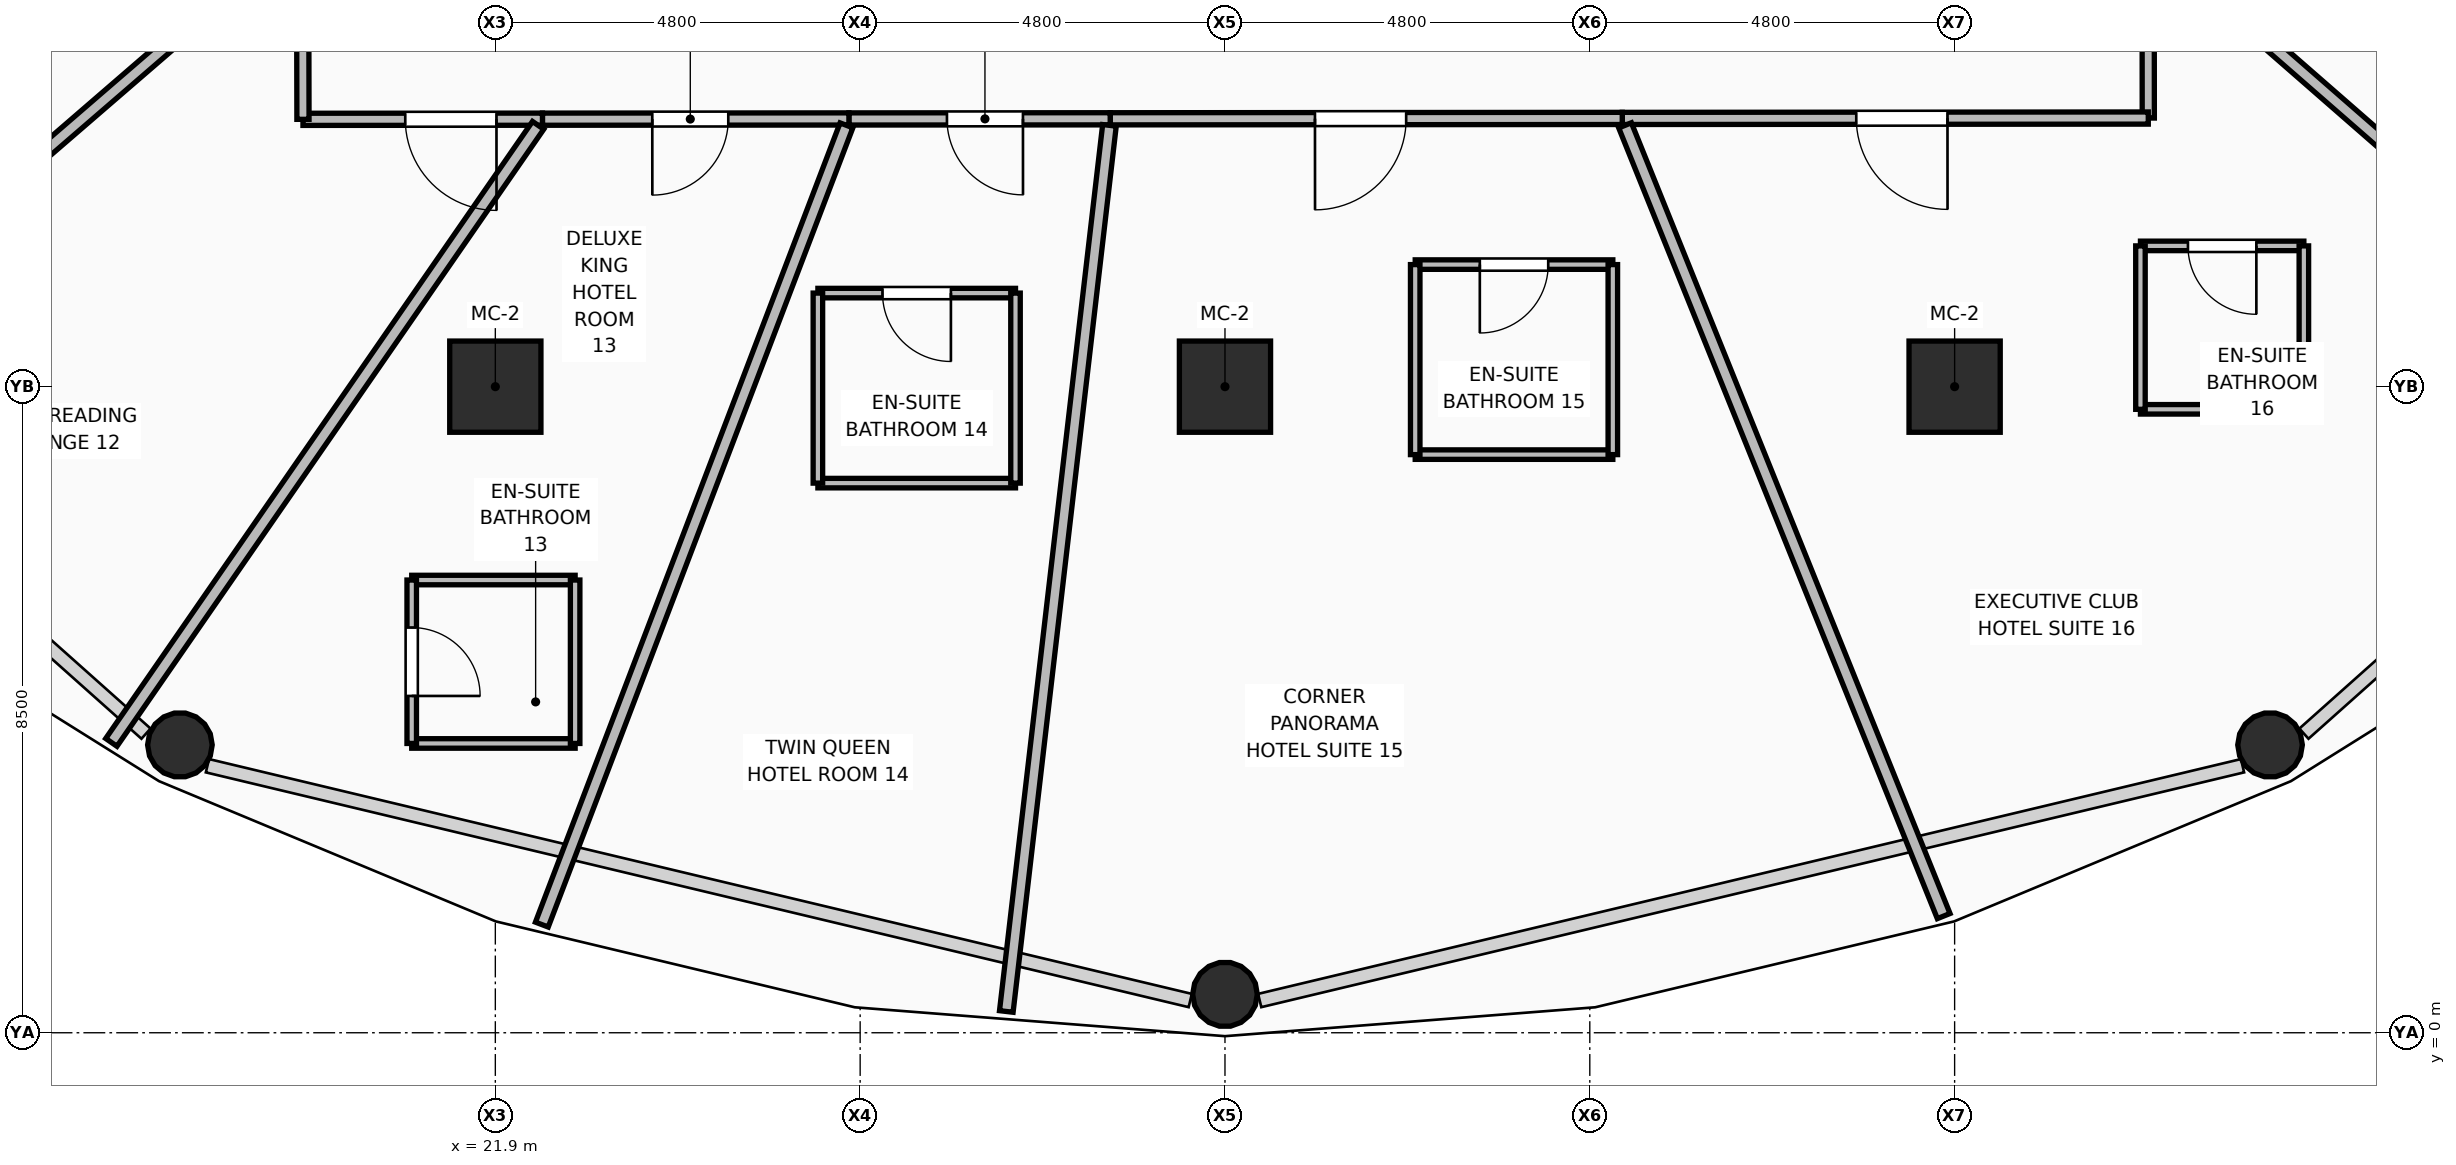
"""IFC4 building model, lengths in metres.
Left out: names, types, materials, properties, quantities, classifications, styles, units other than length and angle.
Written with IfcOpenShell. Run it as: python <this file> out.ifc"""

import sys

from ifc_helpers import new_model, si_unit, direction, frame, frame_2d, origin, origin_2d, place, context, subcontext, project, spatial, rectangle, hollow_rectangle, hollow_circle, extrude, element, fill, save


model = new_model("IFC4")
c1 = context("Model", 3, precision=1e-05, world=origin(), true_north=direction((0.0, 1.0)))
c2 = subcontext(c1, "Body", "Model", "MODEL_VIEW")
j1 = project(units=[si_unit("LENGTHUNIT", "METRE"), si_unit("PLANEANGLEUNIT", "RADIAN")], contexts=[c1])
p1 = place(None, origin())
s1 = spatial("IfcSite", under=j1, at=p1, CompositionType="ELEMENT")
p2 = place(p1, origin())
s2 = spatial("IfcBuilding", under=s1, at=p2, CompositionType="ELEMENT")
p3 = place(p2, frame((0.0, 0.0, 83.25)))
s3 = spatial("IfcBuildingStorey", under=s2, at=p3, CompositionType="ELEMENT", Elevation=83.25)
for number, where, z_axis, x_axis in (
    (1, (21.9, 8.5, 0.0), (0.0, 0.0, 1.0), (1.0, 0.0, 0.0)),
    (2, (31.5, 8.5, 0.0), (0.0, 0.0, 1.0), (1.0, 0.0, 0.0)),
    (3, (41.1, 8.5, 0.0), (0.0, 0.0, 1.0), (1.0, 0.0, 0.0)),
):
    element("IfcColumn", number, at=place(p3, frame(where, z_axis=z_axis, x_axis=x_axis)), inside=s3, PredefinedType="COLUMN", context=c2, shape_type="SweptSolid", body=[
        extrude(hollow_rectangle(XDim=1.2, YDim=1.2, WallThickness=0.045, at=origin_2d()), origin(), (0.0, 0.0, 1.0), 3.75),
    ])
for number, where, z_axis, x_axis in (
    (4, (17.75, 3.787, 0.0), (0.0, 0.0, 1.0), (1.0, 0.0, 0.0)),
    (5, (31.5, 0.505, 0.0), (0.0, 0.0, 1.0), (1.0, 0.0, 0.0)),
    (6, (45.25, 3.787, 0.0), (0.0, 0.0, 1.0), (1.0, 0.0, 0.0)),
):
    element("IfcColumn", number, at=place(p3, frame(where, z_axis=z_axis, x_axis=x_axis)), inside=s3, PredefinedType="COLUMN", context=c2, shape_type="SweptSolid", body=[
        extrude(hollow_circle(Radius=0.425, WallThickness=0.04, at=origin_2d()), origin(), (0.0, 0.0, 1.0), 3.57),
    ])
p4 = place(p3, frame((43.646, 14.406, 0.0), z_axis=(0.0, 0.0, 1.0), x_axis=(0.00082338383, -0.999999661019, 0.0)))
e7 = element("IfcWall", 7, at=p4, inside=s3, PredefinedType="PARTITIONING", context=c2, shape_type="SweptSolid", body=[
    extrude(rectangle(XDim=2.372, YDim=0.16, at=frame_2d((1.186, 0.0))), origin(), (0.0, 0.0, 1.0), 3.55),
])
p5 = place(p3, frame((43.648, 12.034, 0.0), z_axis=(0.0, 0.0, 1.0), x_axis=(-0.999999751123, -0.000705516968, 0.0)))
e8 = element("IfcWall", 8, at=p5, inside=s3, PredefinedType="PARTITIONING", context=c2, shape_type="SweptSolid", body=[
    extrude(rectangle(XDim=6.921, YDim=0.16, at=frame_2d((3.46, 0.0))), origin(), (0.0, 0.0, 1.0), 2.928),
])
p6 = place(p5, frame((2.642, 0.0, 0.0)))
e9 = element("IfcOpeningElement", 9, at=p6, cuts=e8, PredefinedType="OPENING", context=c2, shape_type="SweptSolid", body=[
    extrude(rectangle(XDim=1.2, YDim=2.1, at=frame_2d((0.6, 1.05))), frame((0.0, 0.09, 0.0), z_axis=(0.0, -1.0, 0.0), x_axis=(1.0, 0.0, 0.0)), (0.0, 0.0, 1.0), 0.18),
])
p7 = place(p3, frame((36.727, 12.029, 0.0), z_axis=(0.0, 0.0, 1.0), x_axis=(-0.999999710434, -0.000761007209, 0.0)))
e10 = element("IfcWall", 10, at=p7, inside=s3, PredefinedType="PARTITIONING", context=c2, shape_type="SweptSolid", body=[
    extrude(rectangle(XDim=6.737, YDim=0.16, at=frame_2d((3.369, 0.0))), origin(), (0.0, 0.0, 1.0), 2.928),
])
p8 = place(p7, frame((2.843, 0.0, 0.0)))
e11 = element("IfcOpeningElement", 11, at=p8, cuts=e10, PredefinedType="OPENING", context=c2, shape_type="SweptSolid", body=[
    extrude(rectangle(XDim=1.2, YDim=2.1, at=frame_2d((0.6, 1.05))), frame((0.0, 0.09, 0.0), z_axis=(0.0, -1.0, 0.0), x_axis=(1.0, 0.0, 0.0)), (0.0, 0.0, 1.0), 0.18),
])
p9 = place(p3, frame((29.99, 12.024, 0.0), z_axis=(0.0, 0.0, 1.0), x_axis=(-0.999999838631, -0.00056810103, 0.0)))
e12 = element("IfcWall", 12, at=p9, inside=s3, PredefinedType="PARTITIONING", context=c2, shape_type="SweptSolid", body=[
    extrude(rectangle(XDim=3.438, YDim=0.16, at=frame_2d((1.719, 0.0))), origin(), (0.0, 0.0, 1.0), 3.55),
])
p10 = place(p9, frame((1.148, 0.0, 0.0)))
e13 = element("IfcOpeningElement", 13, at=p10, cuts=e12, PredefinedType="OPENING", context=c2, shape_type="SweptSolid", body=[
    extrude(rectangle(XDim=1.0, YDim=2.1, at=frame_2d((0.5, 1.05))), frame((0.0, 0.09, 0.0), z_axis=(0.0, -1.0, 0.0), x_axis=(1.0, 0.0, 0.0)), (0.0, 0.0, 1.0), 0.18),
])
p11 = place(p3, frame((26.552, 12.022, 0.0), z_axis=(0.0, 0.0, 1.0), x_axis=(-0.999999736017, -0.000726611979, 0.0)))
e14 = element("IfcWall", 14, at=p11, inside=s3, PredefinedType="PARTITIONING", context=c2, shape_type="SweptSolid", body=[
    extrude(rectangle(XDim=4.032, YDim=0.16, at=frame_2d((2.016, 0.0))), origin(), (0.0, 0.0, 1.0), 3.55),
])
p12 = place(p11, frame((1.587, 0.0, 0.0)))
e15 = element("IfcOpeningElement", 15, at=p12, cuts=e14, PredefinedType="OPENING", context=c2, shape_type="SweptSolid", body=[
    extrude(rectangle(XDim=1.0, YDim=2.1, at=frame_2d((0.5, 1.05))), frame((0.0, 0.09, 0.0), z_axis=(0.0, -1.0, 0.0), x_axis=(1.0, 0.0, 0.0)), (0.0, 0.0, 1.0), 0.18),
])
p13 = place(p3, frame((22.52, 12.019, 0.0), z_axis=(0.0, 0.0, 1.0), x_axis=(-0.999999807912, -0.000619818584, 0.0)))
e16 = element("IfcWall", 16, at=p13, inside=s3, PredefinedType="PARTITIONING", context=c2, shape_type="SweptSolid", body=[
    extrude(rectangle(XDim=3.151, YDim=0.16, at=frame_2d((1.576, 0.0))), origin(), (0.0, 0.0, 1.0), 2.928),
])
p14 = place(p13, frame((0.605, 0.0, 0.0)))
e17 = element("IfcOpeningElement", 17, at=p14, cuts=e16, PredefinedType="OPENING", context=c2, shape_type="SweptSolid", body=[
    extrude(rectangle(XDim=1.2, YDim=2.1, at=frame_2d((0.6, 1.05))), frame((0.0, 0.09, 0.0), z_axis=(0.0, -1.0, 0.0), x_axis=(1.0, 0.0, 0.0)), (0.0, 0.0, 1.0), 0.18),
])
p15 = place(p3, frame((19.369, 12.017, 0.0), z_axis=(0.0, 0.0, 1.0), x_axis=(-0.001947036808, 0.999998104522, 0.0)))
e18 = element("IfcWall", 18, at=p15, inside=s3, PredefinedType="PARTITIONING", context=c2, shape_type="SweptSolid", body=[
    extrude(rectangle(XDim=2.508, YDim=0.16, at=frame_2d((1.254, 0.0))), origin(), (0.0, 0.0, 1.0), 3.55),
])
p16 = place(p3, frame((19.272, 18.099, 0.0), z_axis=(0.0, 0.0, 1.0), x_axis=(-0.870816794363, -0.491607679614, 0.0)))
e19 = element("IfcWall", 19, at=p16, inside=s3, PredefinedType="PARTITIONING", context=c2, shape_type="SweptSolid", body=[
    extrude(rectangle(XDim=13.011, YDim=0.18, at=frame_2d((6.505, 0.0))), origin(), (0.0, 0.0, 1.0), 2.775),
])
p17 = place(p3, frame((19.272, 14.446, 0.0), z_axis=(0.0, 0.0, 1.0), x_axis=(-0.756957430289, -0.653464190855, 0.0)))
e20 = element("IfcWall", 20, at=p17, inside=s3, PredefinedType="PARTITIONING", context=c2, shape_type="SweptSolid", body=[
    extrude(rectangle(XDim=10.29, YDim=0.18, at=frame_2d((5.145, 0.0))), origin(), (0.0, 0.0, 1.0), 2.775),
])
p18 = place(p3, frame((22.463, 11.938, 0.0), z_axis=(0.0, 0.0, 1.0), x_axis=(-0.568860087872, -0.822434313746, 0.0)))
e21 = element("IfcWall", 21, at=p18, inside=s3, PredefinedType="PARTITIONING", context=c2, shape_type="SweptSolid", body=[
    extrude(rectangle(XDim=9.871, YDim=0.18, at=frame_2d((4.935, 0.0))), origin(), (0.0, 0.0, 1.0), 2.775),
])
p19 = place(p3, frame((26.52, 11.938, 0.0), z_axis=(0.0, 0.0, 1.0), x_axis=(-0.356180272112, -0.934417258915, 0.0)))
e22 = element("IfcWall", 22, at=p19, inside=s3, PredefinedType="PARTITIONING", context=c2, shape_type="SweptSolid", body=[
    extrude(rectangle(XDim=11.253, YDim=0.18, at=frame_2d((5.626, 0.0))), origin(), (0.0, 0.0, 1.0), 2.775),
])
p20 = place(p3, frame((29.98, 11.938, 0.0), z_axis=(0.0, 0.0, 1.0), x_axis=(-0.115614932855, -0.993294109165, 0.0)))
e23 = element("IfcWall", 23, at=p20, inside=s3, PredefinedType="PARTITIONING", context=c2, shape_type="SweptSolid", body=[
    extrude(rectangle(XDim=11.737, YDim=0.18, at=frame_2d((5.868, 0.0))), origin(), (0.0, 0.0, 1.0), 2.775),
])
p21 = place(p3, frame((36.764, 11.938, 0.0), z_axis=(0.0, 0.0, 1.0), x_axis=(0.373765091029, -0.927523399558, 0.0)))
e24 = element("IfcWall", 24, at=p21, inside=s3, PredefinedType="PARTITIONING", context=c2, shape_type="SweptSolid", body=[
    extrude(rectangle(XDim=11.216, YDim=0.18, at=frame_2d((5.608, 0.0))), origin(), (0.0, 0.0, 1.0), 2.775),
])
p22 = place(p3, frame((43.728, 14.335, 0.0), z_axis=(0.0, 0.0, 1.0), x_axis=(0.753557452015, -0.657382055211, 0.0)))
e25 = element("IfcWall", 25, at=p22, inside=s3, PredefinedType="PARTITIONING", context=c2, shape_type="SweptSolid", body=[
    extrude(rectangle(XDim=10.2, YDim=0.18, at=frame_2d((5.1, 0.0))), origin(), (0.0, 0.0, 1.0), 2.775),
])
p23 = place(p3, frame((43.728, 18.232, 0.0), z_axis=(0.0, 0.0, 1.0), x_axis=(0.874929134989, -0.484250977022, 0.0)))
e26 = element("IfcWall", 26, at=p23, inside=s3, PredefinedType="PARTITIONING", context=c2, shape_type="SweptSolid", body=[
    extrude(rectangle(XDim=13.111, YDim=0.18, at=frame_2d((6.555, 0.0))), origin(), (0.0, 0.0, 1.0), 2.775),
])
for number, where, z_axis, x_axis in (
    (27, (20.8, 3.806, 0.0), (0.0, 0.0, 1.0), (1.0, 0.0, 0.0)),
    (28, (20.8, 5.956, 0.0), (0.0, 0.0, 1.0), (1.0, 0.0, 0.0)),
):
    element("IfcWall", number, at=place(p3, frame(where, z_axis=z_axis, x_axis=x_axis)), inside=s3, PredefinedType="PARTITIONING", context=c2, shape_type="SweptSolid", body=[
        extrude(rectangle(XDim=2.15, YDim=0.125, at=frame_2d((1.075, 0.0))), origin(), (0.0, 0.0, 1.0), 3.55),
    ])
p24 = place(p3, frame((20.8, 3.806, 0.0), z_axis=(0.0, 0.0, 1.0), x_axis=(0.0, 1.0, 0.0)))
e29 = element("IfcWall", 29, at=p24, inside=s3, PredefinedType="PARTITIONING", context=c2, shape_type="SweptSolid", body=[
    extrude(rectangle(XDim=2.15, YDim=0.125, at=frame_2d((1.075, 0.0))), origin(), (0.0, 0.0, 1.0), 3.55),
])
p25 = place(p24, frame((0.625, 0.0, 0.0)))
e30 = element("IfcOpeningElement", 30, at=p25, cuts=e29, PredefinedType="OPENING", context=c2, shape_type="SweptSolid", body=[
    extrude(rectangle(XDim=0.9, YDim=2.1, at=frame_2d((0.45, 1.05))), frame((0.0, 0.073, 0.0), z_axis=(0.0, -1.0, 0.0), x_axis=(1.0, 0.0, 0.0)), (0.0, 0.0, 1.0), 0.145),
])
p26 = place(p3, frame((22.95, 3.806, 0.0), z_axis=(0.0, 0.0, 1.0), x_axis=(0.0, 1.0, 0.0)))
e31 = element("IfcWall", 31, at=p26, inside=s3, PredefinedType="PARTITIONING", context=c2, shape_type="SweptSolid", body=[
    extrude(rectangle(XDim=2.15, YDim=0.125, at=frame_2d((1.075, 0.0))), origin(), (0.0, 0.0, 1.0), 3.55),
])
p27 = place(p3, frame((26.144, 7.231, 0.0), z_axis=(0.0, 0.0, 1.0), x_axis=(1.0, 0.0, 0.0)))
e32 = element("IfcWall", 32, at=p27, inside=s3, PredefinedType="PARTITIONING", context=c2, shape_type="SweptSolid", body=[
    extrude(rectangle(XDim=2.6, YDim=0.125, at=frame_2d((1.3, 0.0))), origin(), (0.0, 0.0, 1.0), 3.55),
])
p28 = place(p3, frame((26.144, 9.731, 0.0), z_axis=(0.0, 0.0, 1.0), x_axis=(1.0, 0.0, 0.0)))
e33 = element("IfcWall", 33, at=p28, inside=s3, PredefinedType="PARTITIONING", context=c2, shape_type="SweptSolid", body=[
    extrude(rectangle(XDim=2.6, YDim=0.125, at=frame_2d((1.3, 0.0))), origin(), (0.0, 0.0, 1.0), 3.55),
])
p29 = place(p28, frame((0.85, 0.0, 0.0)))
e34 = element("IfcOpeningElement", 34, at=p29, cuts=e33, PredefinedType="OPENING", context=c2, shape_type="SweptSolid", body=[
    extrude(rectangle(XDim=0.9, YDim=2.1, at=frame_2d((0.45, 1.05))), frame((0.0, 0.073, 0.0), z_axis=(0.0, -1.0, 0.0), x_axis=(1.0, 0.0, 0.0)), (0.0, 0.0, 1.0), 0.145),
])
for number, where, z_axis, x_axis in (
    (35, (26.144, 7.231, 0.0), (0.0, 0.0, 1.0), (0.0, 1.0, 0.0)),
    (36, (28.744, 7.231, 0.0), (0.0, 0.0, 1.0), (0.0, 1.0, 0.0)),
):
    element("IfcWall", number, at=place(p3, frame(where, z_axis=z_axis, x_axis=x_axis)), inside=s3, PredefinedType="PARTITIONING", context=c2, shape_type="SweptSolid", body=[
        extrude(rectangle(XDim=2.5, YDim=0.125, at=frame_2d((1.25, 0.0))), origin(), (0.0, 0.0, 1.0), 3.55),
    ])
p30 = place(p3, frame((34.003, 7.606, 0.0), z_axis=(0.0, 0.0, 1.0), x_axis=(1.0, 0.0, 0.0)))
e37 = element("IfcWall", 37, at=p30, inside=s3, PredefinedType="PARTITIONING", context=c2, shape_type="SweptSolid", body=[
    extrude(rectangle(XDim=2.6, YDim=0.125, at=frame_2d((1.3, 0.0))), origin(), (0.0, 0.0, 1.0), 3.55),
])
p31 = place(p3, frame((34.003, 10.106, 0.0), z_axis=(0.0, 0.0, 1.0), x_axis=(1.0, 0.0, 0.0)))
e38 = element("IfcWall", 38, at=p31, inside=s3, PredefinedType="PARTITIONING", context=c2, shape_type="SweptSolid", body=[
    extrude(rectangle(XDim=2.6, YDim=0.125, at=frame_2d((1.3, 0.0))), origin(), (0.0, 0.0, 1.0), 3.55),
])
p32 = place(p31, frame((0.85, 0.0, 0.0)))
e39 = element("IfcOpeningElement", 39, at=p32, cuts=e38, PredefinedType="OPENING", context=c2, shape_type="SweptSolid", body=[
    extrude(rectangle(XDim=0.9, YDim=2.1, at=frame_2d((0.45, 1.05))), frame((0.0, 0.073, 0.0), z_axis=(0.0, -1.0, 0.0), x_axis=(1.0, 0.0, 0.0)), (0.0, 0.0, 1.0), 0.145),
])
for number, where, z_axis, x_axis in (
    (40, (34.003, 7.606, 0.0), (0.0, 0.0, 1.0), (0.0, 1.0, 0.0)),
    (41, (36.603, 7.606, 0.0), (0.0, 0.0, 1.0), (0.0, 1.0, 0.0)),
):
    element("IfcWall", number, at=place(p3, frame(where, z_axis=z_axis, x_axis=x_axis)), inside=s3, PredefinedType="PARTITIONING", context=c2, shape_type="SweptSolid", body=[
        extrude(rectangle(XDim=2.5, YDim=0.125, at=frame_2d((1.25, 0.0))), origin(), (0.0, 0.0, 1.0), 3.55),
    ])
p33 = place(p3, frame((43.545, 8.202, 0.0), z_axis=(0.0, 0.0, 1.0), x_axis=(1.0, 0.0, 0.0)))
e42 = element("IfcWall", 42, at=p33, inside=s3, PredefinedType="PARTITIONING", context=c2, shape_type="SweptSolid", body=[
    extrude(rectangle(XDim=2.15, YDim=0.125, at=frame_2d((1.075, 0.0))), origin(), (0.0, 0.0, 1.0), 2.928),
])
p34 = place(p3, frame((43.545, 10.352, 0.0), z_axis=(0.0, 0.0, 1.0), x_axis=(1.0, 0.0, 0.0)))
e43 = element("IfcWall", 43, at=p34, inside=s3, PredefinedType="PARTITIONING", context=c2, shape_type="SweptSolid", body=[
    extrude(rectangle(XDim=2.15, YDim=0.125, at=frame_2d((1.075, 0.0))), origin(), (0.0, 0.0, 1.0), 2.928),
])
p35 = place(p34, frame((0.625, 0.0, 0.0)))
e44 = element("IfcOpeningElement", 44, at=p35, cuts=e43, PredefinedType="OPENING", context=c2, shape_type="SweptSolid", body=[
    extrude(rectangle(XDim=0.9, YDim=2.1, at=frame_2d((0.45, 1.05))), frame((0.0, 0.073, 0.0), z_axis=(0.0, -1.0, 0.0), x_axis=(1.0, 0.0, 0.0)), (0.0, 0.0, 1.0), 0.145),
])
p36 = place(p3, frame((43.545, 8.202, 0.0), z_axis=(0.0, 0.0, 1.0), x_axis=(0.0, 1.0, 0.0)))
e45 = element("IfcWall", 45, at=p36, inside=s3, PredefinedType="PARTITIONING", context=c2, shape_type="SweptSolid", body=[
    extrude(rectangle(XDim=2.15, YDim=0.125, at=frame_2d((1.075, 0.0))), origin(), (0.0, 0.0, 1.0), 2.928),
])
p37 = place(p3, frame((45.695, 8.202, 0.0), z_axis=(0.0, 0.0, 1.0), x_axis=(0.0, 1.0, 0.0)))
e46 = element("IfcWall", 46, at=p37, inside=s3, PredefinedType="PARTITIONING", context=c2, shape_type="SweptSolid", body=[
    extrude(rectangle(XDim=2.15, YDim=0.125, at=frame_2d((1.075, 0.0))), origin(), (0.0, 0.0, 1.0), 3.55),
])
p38 = place(p14, origin())
e47 = element("IfcDoor", 47, at=p38, inside=s3, OperationType="SINGLE_SWING_LEFT", PredefinedType="DOOR", context=c2, shape_type="SweptSolid", body=[
    extrude(rectangle(XDim=1.2, YDim=2.1, at=frame_2d((0.6, 1.05))), frame((0.0, 0.025, 0.0), z_axis=(0.0, -1.0, 0.0), x_axis=(1.0, 0.0, 0.0)), (0.0, 0.0, 1.0), 0.05),
])
fill(e17, e47)
p39 = place(p25, frame((0.9, 0.0, 0.0), z_axis=(0.0, 0.0, 1.0), x_axis=(-1.0, 0.0, 0.0)))
e48 = element("IfcDoor", 48, at=p39, inside=s3, OperationType="SINGLE_SWING_RIGHT", PredefinedType="DOOR", context=c2, shape_type="SweptSolid", body=[
    extrude(rectangle(XDim=0.9, YDim=2.1, at=frame_2d((0.45, 1.05))), frame((0.0, 0.025, 0.0), z_axis=(0.0, -1.0, 0.0), x_axis=(1.0, 0.0, 0.0)), (0.0, 0.0, 1.0), 0.05),
])
fill(e30, e48)
p40 = place(p12, origin())
e49 = element("IfcDoor", 49, at=p40, inside=s3, OperationType="SINGLE_SWING_RIGHT", PredefinedType="DOOR", context=c2, shape_type="SweptSolid", body=[
    extrude(rectangle(XDim=1.0, YDim=2.1, at=frame_2d((0.5, 1.05))), frame((0.0, 0.025, 0.0), z_axis=(0.0, -1.0, 0.0), x_axis=(1.0, 0.0, 0.0)), (0.0, 0.0, 1.0), 0.05),
])
fill(e15, e49)
p41 = place(p29, frame((0.9, 0.0, 0.0), z_axis=(0.0, 0.0, 1.0), x_axis=(-1.0, 0.0, 0.0)))
e50 = element("IfcDoor", 50, at=p41, inside=s3, OperationType="SINGLE_SWING_LEFT", PredefinedType="DOOR", context=c2, shape_type="SweptSolid", body=[
    extrude(rectangle(XDim=0.9, YDim=2.1, at=frame_2d((0.45, 1.05))), frame((0.0, 0.025, 0.0), z_axis=(0.0, -1.0, 0.0), x_axis=(1.0, 0.0, 0.0)), (0.0, 0.0, 1.0), 0.05),
])
fill(e34, e50)
p42 = place(p10, origin())
e51 = element("IfcDoor", 51, at=p42, inside=s3, OperationType="SINGLE_SWING_LEFT", PredefinedType="DOOR", context=c2, shape_type="SweptSolid", body=[
    extrude(rectangle(XDim=1.0, YDim=2.1, at=frame_2d((0.5, 1.05))), frame((0.0, 0.025, 0.0), z_axis=(0.0, -1.0, 0.0), x_axis=(1.0, 0.0, 0.0)), (0.0, 0.0, 1.0), 0.05),
])
fill(e13, e51)
p43 = place(p32, frame((0.9, 0.0, 0.0), z_axis=(0.0, 0.0, 1.0), x_axis=(-1.0, 0.0, 0.0)))
e52 = element("IfcDoor", 52, at=p43, inside=s3, OperationType="SINGLE_SWING_RIGHT", PredefinedType="DOOR", context=c2, shape_type="SweptSolid", body=[
    extrude(rectangle(XDim=0.9, YDim=2.1, at=frame_2d((0.45, 1.05))), frame((0.0, 0.025, 0.0), z_axis=(0.0, -1.0, 0.0), x_axis=(1.0, 0.0, 0.0)), (0.0, 0.0, 1.0), 0.05),
])
fill(e39, e52)
p44 = place(p8, origin())
e53 = element("IfcDoor", 53, at=p44, inside=s3, OperationType="SINGLE_SWING_RIGHT", PredefinedType="DOOR", context=c2, shape_type="SweptSolid", body=[
    extrude(rectangle(XDim=1.2, YDim=2.1, at=frame_2d((0.6, 1.05))), frame((0.0, 0.025, 0.0), z_axis=(0.0, -1.0, 0.0), x_axis=(1.0, 0.0, 0.0)), (0.0, 0.0, 1.0), 0.05),
])
fill(e11, e53)
p45 = place(p35, frame((0.9, 0.0, 0.0), z_axis=(0.0, 0.0, 1.0), x_axis=(-1.0, 0.0, 0.0)))
e54 = element("IfcDoor", 54, at=p45, inside=s3, OperationType="SINGLE_SWING_LEFT", PredefinedType="DOOR", context=c2, shape_type="SweptSolid", body=[
    extrude(rectangle(XDim=0.9, YDim=2.1, at=frame_2d((0.45, 1.05))), frame((0.0, 0.025, 0.0), z_axis=(0.0, -1.0, 0.0), x_axis=(1.0, 0.0, 0.0)), (0.0, 0.0, 1.0), 0.05),
])
fill(e44, e54)
p46 = place(p6, origin())
e55 = element("IfcDoor", 55, at=p46, inside=s3, OperationType="SINGLE_SWING_LEFT", PredefinedType="DOOR", context=c2, shape_type="SweptSolid", body=[
    extrude(rectangle(XDim=1.2, YDim=2.1, at=frame_2d((0.6, 1.05))), frame((0.0, 0.025, 0.0), z_axis=(0.0, -1.0, 0.0), x_axis=(1.0, 0.0, 0.0)), (0.0, 0.0, 1.0), 0.05),
])
fill(e9, e55)
save(model, sys.argv[1])
